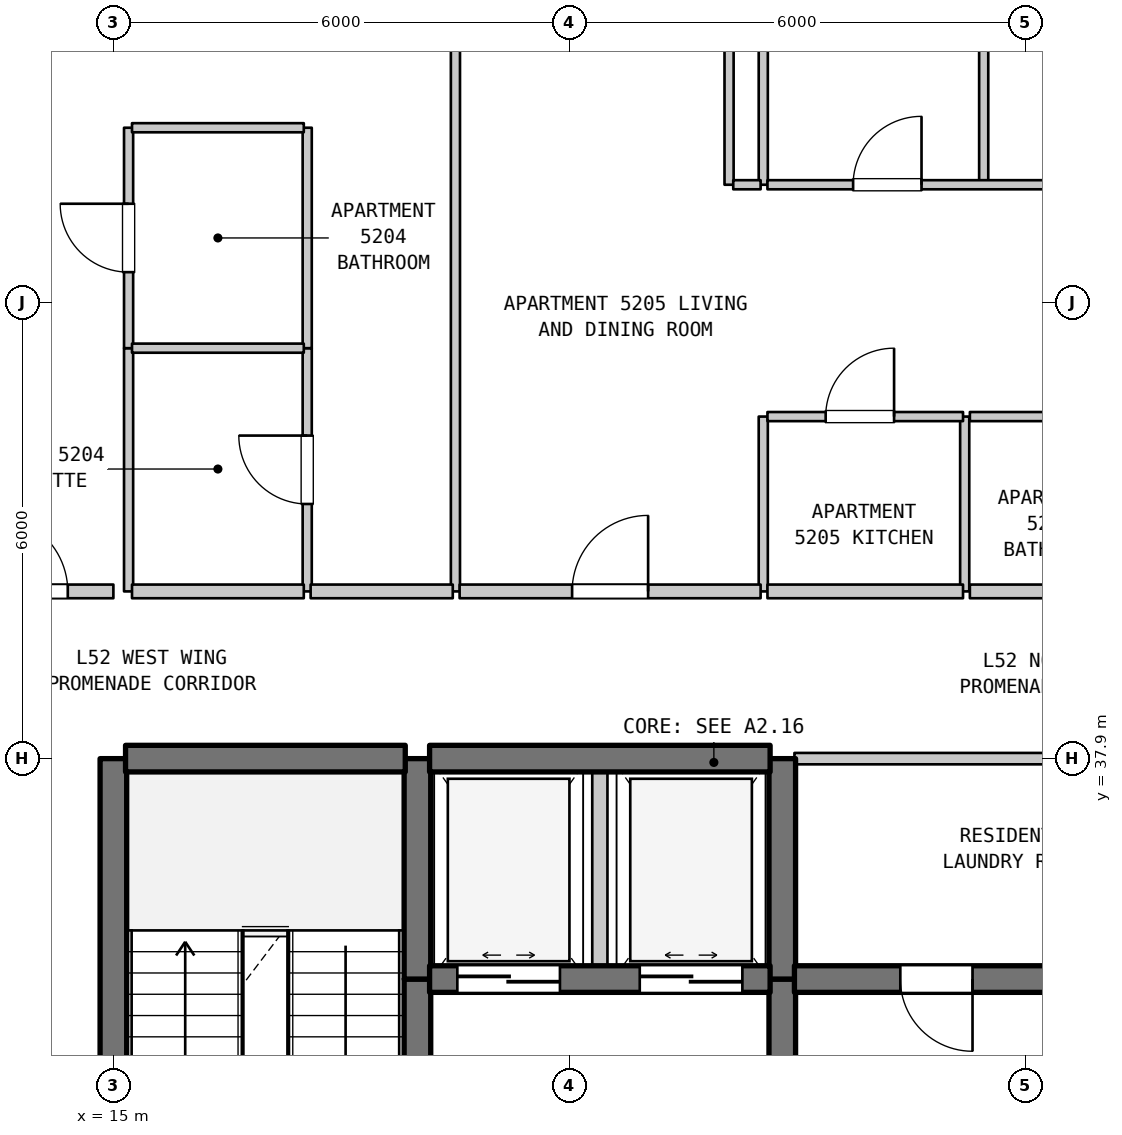
"""IFC4 building model, lengths in metres.
Left out: names, types, materials, properties, quantities, classifications, styles, units other than length and angle.
Written with IfcOpenShell. Run it as: python <this file> out.ifc"""

import sys

from ifc_helpers import new_model, si_unit, direction, frame, frame_2d, origin, place, context, subcontext, project, spatial, rectangle, extrude, element, fill, save


model = new_model("IFC4")
c1 = context("Model", 3, precision=1e-05, world=origin(), true_north=direction((0.0, 1.0)))
c2 = subcontext(c1, "Body", "Model", "MODEL_VIEW")
j1 = project(units=[si_unit("LENGTHUNIT", "METRE"), si_unit("PLANEANGLEUNIT", "RADIAN")], contexts=[c1])
p1 = place(None, origin())
s1 = spatial("IfcSite", under=j1, at=p1, CompositionType="ELEMENT")
p2 = place(p1, origin())
s2 = spatial("IfcBuilding", under=s1, at=p2, CompositionType="ELEMENT")
p3 = place(p2, frame((0.0, 0.0, 210.6)))
s3 = spatial("IfcBuildingStorey", under=s2, at=p3, CompositionType="ELEMENT", Elevation=210.6)
p4 = place(p3, frame((15.0, 31.1, 0.0), z_axis=(0.0, 0.0, 1.0), x_axis=(0.0, 1.0, 0.0)))
e1 = element("IfcWall", 1, at=p4, inside=s3, PredefinedType="SHEAR", context=c2, shape_type="SweptSolid", body=[
    extrude(rectangle(XDim=6.8, YDim=0.35, at=frame_2d((3.4, 0.0))), origin(), (0.0, 0.0, 1.0), 3.39),
])
p5 = place(p3, frame((15.2, 40.1, 0.0), z_axis=(0.0, 0.0, 1.0), x_axis=(0.0, 1.0, 0.0)))
e2 = element("IfcWall", 2, at=p5, inside=s3, PredefinedType="PARTITIONING", context=c2, shape_type="SweptSolid", body=[
    extrude(rectangle(XDim=3.2, YDim=0.12, at=frame_2d((1.6, 0.0))), origin(), (0.0, 0.0, 1.0), 3.39),
])
p6 = place(p3, frame((15.2, 43.3, 0.0), z_axis=(0.0, 0.0, 1.0), x_axis=(0.0, 1.0, 0.0)))
e3 = element("IfcWall", 3, at=p6, inside=s3, PredefinedType="PARTITIONING", context=c2, shape_type="SweptSolid", body=[
    extrude(rectangle(XDim=2.9, YDim=0.12, at=frame_2d((1.45, 0.0))), origin(), (0.0, 0.0, 1.0), 3.39),
])
p7 = place(p6, frame((1.0, 0.0, 0.0)))
e4 = element("IfcOpeningElement", 4, at=p7, cuts=e3, PredefinedType="OPENING", context=c2, shape_type="SweptSolid", body=[
    extrude(rectangle(XDim=0.9, YDim=2.1, at=frame_2d((0.45, 1.05))), frame((0.0, 0.07, 0.0), z_axis=(0.0, -1.0, 0.0), x_axis=(1.0, 0.0, 0.0)), (0.0, 0.0, 1.0), 0.14),
])
p8 = place(p3, frame((17.55, 40.1, 0.0), z_axis=(0.0, 0.0, 1.0), x_axis=(0.0, 1.0, 0.0)))
e5 = element("IfcWall", 5, at=p8, inside=s3, PredefinedType="PARTITIONING", context=c2, shape_type="SweptSolid", body=[
    extrude(rectangle(XDim=3.2, YDim=0.12, at=frame_2d((1.6, 0.0))), origin(), (0.0, 0.0, 1.0), 3.39),
])
p9 = place(p8, frame((1.15, 0.0, 0.0)))
e6 = element("IfcOpeningElement", 6, at=p9, cuts=e5, PredefinedType="OPENING", context=c2, shape_type="SweptSolid", body=[
    extrude(rectangle(XDim=0.9, YDim=2.15, at=frame_2d((0.45, 1.075))), frame((0.0, 0.07, 0.0), z_axis=(0.0, -1.0, 0.0), x_axis=(1.0, 0.0, 0.0)), (0.0, 0.0, 1.0), 0.14),
])
p10 = place(p3, frame((17.55, 43.3, 0.0), z_axis=(0.0, 0.0, 1.0), x_axis=(0.0, 1.0, 0.0)))
e7 = element("IfcWall", 7, at=p10, inside=s3, PredefinedType="PARTITIONING", context=c2, shape_type="SweptSolid", body=[
    extrude(rectangle(XDim=2.9, YDim=0.12, at=frame_2d((1.45, 0.0))), origin(), (0.0, 0.0, 1.0), 3.39),
])
p11 = place(p3, frame((19.0, 29.5, 0.0), z_axis=(0.0, 0.0, 1.0), x_axis=(0.0, 1.0, 0.0)))
e8 = element("IfcWall", 8, at=p11, inside=s3, PredefinedType="SHEAR", context=c2, shape_type="SweptSolid", body=[
    extrude(rectangle(XDim=5.5, YDim=0.35, at=frame_2d((2.75, 0.0))), origin(), (0.0, 0.0, 1.0), 3.39),
])
p12 = place(p11, frame((2.025, 0.0, 0.0)))
e9 = element("IfcOpeningElement", 9, at=p12, cuts=e8, PredefinedType="OPENING", context=c2, shape_type="SweptSolid", body=[
    extrude(rectangle(XDim=1.1, YDim=2.15, at=frame_2d((0.55, 1.075))), frame((0.0, 0.185, 0.0), z_axis=(0.0, -1.0, 0.0), x_axis=(1.0, 0.0, 0.0)), (0.0, 0.0, 1.0), 0.37),
])
p13 = place(p3, frame((19.0, 35.0, 0.0), z_axis=(0.0, 0.0, 1.0), x_axis=(0.0, 1.0, 0.0)))
e10 = element("IfcWall", 10, at=p13, inside=s3, PredefinedType="SHEAR", context=c2, shape_type="SweptSolid", body=[
    extrude(rectangle(XDim=2.9, YDim=0.35, at=frame_2d((1.45, 0.0))), origin(), (0.0, 0.0, 1.0), 3.39),
])
p14 = place(p3, frame((19.5, 40.1, 0.0), z_axis=(0.0, 0.0, 1.0), x_axis=(0.0, 1.0, 0.0)))
e11 = element("IfcWall", 11, at=p14, inside=s3, PredefinedType="PARTITIONING", context=c2, shape_type="SweptSolid", body=[
    extrude(rectangle(XDim=13.79, YDim=0.12, at=frame_2d((6.895, 0.0))), origin(), (0.0, 0.0, 1.0), 3.39),
])
p15 = place(p3, frame((21.4, 35.0, 0.0), z_axis=(0.0, 0.0, 1.0), x_axis=(0.0, 1.0, 0.0)))
e12 = element("IfcWall", 12, at=p15, inside=s3, PredefinedType="STANDARD", context=c2, shape_type="SweptSolid", body=[
    extrude(rectangle(XDim=2.9, YDim=0.2, at=frame_2d((1.45, 0.0))), origin(), (0.0, 0.0, 1.0), 3.39),
])
p16 = place(p3, frame((23.1, 45.45, 0.0), z_axis=(0.0, 0.0, 1.0), x_axis=(0.0, 1.0, 0.0)))
e13 = element("IfcWall", 13, at=p16, inside=s3, PredefinedType="PARTITIONING", context=c2, shape_type="SweptSolid", body=[
    extrude(rectangle(XDim=8.44, YDim=0.12, at=frame_2d((4.22, 0.0))), origin(), (0.0, 0.0, 1.0), 3.39),
])
p17 = place(p3, frame((23.55, 40.1, 0.0), z_axis=(0.0, 0.0, 1.0), x_axis=(0.0, 1.0, 0.0)))
e14 = element("IfcWall", 14, at=p17, inside=s3, PredefinedType="PARTITIONING", context=c2, shape_type="SweptSolid", body=[
    extrude(rectangle(XDim=2.3, YDim=0.12, at=frame_2d((1.15, 0.0))), origin(), (0.0, 0.0, 1.0), 3.39),
])
p18 = place(p3, frame((23.55, 45.45, 0.0), z_axis=(0.0, 0.0, 1.0), x_axis=(0.0, 1.0, 0.0)))
e15 = element("IfcWall", 15, at=p18, inside=s3, PredefinedType="PARTITIONING", context=c2, shape_type="SweptSolid", body=[
    extrude(rectangle(XDim=8.44, YDim=0.12, at=frame_2d((4.22, 0.0))), origin(), (0.0, 0.0, 1.0), 3.39),
])
p19 = place(p3, frame((23.8, 31.5, 0.0), z_axis=(0.0, 0.0, 1.0), x_axis=(0.0, 1.0, 0.0)))
e16 = element("IfcWall", 16, at=p19, inside=s3, PredefinedType="SHEAR", context=c2, shape_type="SweptSolid", body=[
    extrude(rectangle(XDim=3.5, YDim=0.35, at=frame_2d((1.75, 0.0))), origin(), (0.0, 0.0, 1.0), 3.39),
])
p20 = place(p19, frame((1.127, 0.0, 0.0)))
e17 = element("IfcOpeningElement", 17, at=p20, cuts=e16, PredefinedType="OPENING", context=c2, shape_type="SweptSolid", body=[
    extrude(rectangle(XDim=1.1, YDim=2.15, at=frame_2d((0.55, 1.075))), frame((0.0, 0.185, 0.0), z_axis=(0.0, -1.0, 0.0), x_axis=(1.0, 0.0, 0.0)), (0.0, 0.0, 1.0), 0.37),
])
p21 = place(p3, frame((23.8, 35.0, 0.0), z_axis=(0.0, 0.0, 1.0), x_axis=(0.0, 1.0, 0.0)))
e18 = element("IfcWall", 18, at=p21, inside=s3, PredefinedType="SHEAR", context=c2, shape_type="SweptSolid", body=[
    extrude(rectangle(XDim=2.9, YDim=0.35, at=frame_2d((1.45, 0.0))), origin(), (0.0, 0.0, 1.0), 3.39),
])
p22 = place(p3, frame((26.2, 40.1, 0.0), z_axis=(0.0, 0.0, 1.0), x_axis=(0.0, 1.0, 0.0)))
e19 = element("IfcWall", 19, at=p22, inside=s3, PredefinedType="PARTITIONING", context=c2, shape_type="SweptSolid", body=[
    extrude(rectangle(XDim=2.3, YDim=0.12, at=frame_2d((1.15, 0.0))), origin(), (0.0, 0.0, 1.0), 3.39),
])
p23 = place(p3, frame((26.45, 45.45, 0.0), z_axis=(0.0, 0.0, 1.0), x_axis=(0.0, 1.0, 0.0)))
e20 = element("IfcWall", 20, at=p23, inside=s3, PredefinedType="PARTITIONING", context=c2, shape_type="SweptSolid", body=[
    extrude(rectangle(XDim=8.44, YDim=0.12, at=frame_2d((4.22, 0.0))), origin(), (0.0, 0.0, 1.0), 3.39),
])
p24 = place(p3, frame((19.16, 35.0, 0.0), z_axis=(0.0, 0.0, 1.0), x_axis=(1.0, 0.0, 0.0)))
e21 = element("IfcWall", 21, at=p24, inside=s3, PredefinedType="SHEAR", context=c2, shape_type="SweptSolid", body=[
    extrude(rectangle(XDim=4.48, YDim=0.35, at=frame_2d((2.24, 0.0))), origin(), (0.0, 0.0, 1.0), 3.39),
])
p25 = place(p24, frame((0.365, 0.0, 0.0)))
e22 = element("IfcOpeningElement", 22, at=p25, cuts=e21, PredefinedType="OPENING", context=c2, shape_type="SweptSolid", body=[
    extrude(rectangle(XDim=1.35, YDim=2.2, at=frame_2d((0.675, 1.1))), frame((0.0, 0.185, 0.0), z_axis=(0.0, -1.0, 0.0), x_axis=(1.0, 0.0, 0.0)), (0.0, 0.0, 1.0), 0.37),
])
p26 = place(p24, frame((2.765, 0.0, 0.0)))
e23 = element("IfcOpeningElement", 23, at=p26, cuts=e21, PredefinedType="OPENING", context=c2, shape_type="SweptSolid", body=[
    extrude(rectangle(XDim=1.35, YDim=2.2, at=frame_2d((0.675, 1.1))), frame((0.0, 0.185, 0.0), z_axis=(0.0, -1.0, 0.0), x_axis=(1.0, 0.0, 0.0)), (0.0, 0.0, 1.0), 0.37),
])
p27 = place(p3, frame((23.96, 35.0, 0.0), z_axis=(0.0, 0.0, 1.0), x_axis=(1.0, 0.0, 0.0)))
e24 = element("IfcWall", 24, at=p27, inside=s3, PredefinedType="SHEAR", context=c2, shape_type="SweptSolid", body=[
    extrude(rectangle(XDim=3.995, YDim=0.35, at=frame_2d((1.998, 0.0))), origin(), (0.0, 0.0, 1.0), 3.39),
])
p28 = place(p27, frame((1.393, 0.0, 0.0)))
e25 = element("IfcOpeningElement", 25, at=p28, cuts=e24, PredefinedType="OPENING", context=c2, shape_type="SweptSolid", body=[
    extrude(rectangle(XDim=0.95, YDim=2.15, at=frame_2d((0.475, 1.075))), frame((0.0, 0.185, 0.0), z_axis=(0.0, -1.0, 0.0), x_axis=(1.0, 0.0, 0.0)), (0.0, 0.0, 1.0), 0.37),
])
p29 = place(p3, frame((15.16, 37.9, 0.0), z_axis=(0.0, 0.0, 1.0), x_axis=(1.0, 0.0, 0.0)))
e26 = element("IfcWall", 26, at=p29, inside=s3, PredefinedType="SHEAR", context=c2, shape_type="SweptSolid", body=[
    extrude(rectangle(XDim=3.68, YDim=0.35, at=frame_2d((1.84, 0.0))), origin(), (0.0, 0.0, 1.0), 3.39),
])
p30 = place(p3, frame((19.16, 37.9, 0.0), z_axis=(0.0, 0.0, 1.0), x_axis=(1.0, 0.0, 0.0)))
e27 = element("IfcWall", 27, at=p30, inside=s3, PredefinedType="SHEAR", context=c2, shape_type="SweptSolid", body=[
    extrude(rectangle(XDim=4.48, YDim=0.35, at=frame_2d((2.24, 0.0))), origin(), (0.0, 0.0, 1.0), 3.39),
])
p31 = place(p3, frame((23.96, 37.9, 0.0), z_axis=(0.0, 0.0, 1.0), x_axis=(1.0, 0.0, 0.0)))
e28 = element("IfcWall", 28, at=p31, inside=s3, PredefinedType="STANDARD", context=c2, shape_type="SweptSolid", body=[
    extrude(rectangle(XDim=3.995, YDim=0.15, at=frame_2d((1.998, 0.0))), origin(), (0.0, 0.0, 1.0), 2.89),
])
p32 = place(p3, frame((12.875, 40.1, 0.0), z_axis=(0.0, 0.0, 1.0), x_axis=(1.0, 0.0, 0.0)))
e29 = element("IfcWall", 29, at=p32, inside=s3, PredefinedType="STANDARD", context=c2, shape_type="SweptSolid", body=[
    extrude(rectangle(XDim=2.125, YDim=0.18, at=frame_2d((1.062, 0.0))), origin(), (0.0, 0.0, 1.0), 3.39),
])
p33 = place(p32, frame((0.525, 0.0, 0.0)))
e30 = element("IfcOpeningElement", 30, at=p33, cuts=e29, PredefinedType="OPENING", context=c2, shape_type="SweptSolid", body=[
    extrude(rectangle(XDim=1.0, YDim=2.15, at=frame_2d((0.5, 1.075))), frame((0.0, 0.1, 0.0), z_axis=(0.0, -1.0, 0.0), x_axis=(1.0, 0.0, 0.0)), (0.0, 0.0, 1.0), 0.2),
])
p34 = place(p3, frame((15.245, 40.1, 0.0), z_axis=(0.0, 0.0, 1.0), x_axis=(1.0, 0.0, 0.0)))
e31 = element("IfcWall", 31, at=p34, inside=s3, PredefinedType="STANDARD", context=c2, shape_type="SweptSolid", body=[
    extrude(rectangle(XDim=2.26, YDim=0.18, at=frame_2d((1.13, 0.0))), origin(), (0.0, 0.0, 1.0), 3.39),
])
p35 = place(p3, frame((17.595, 40.1, 0.0), z_axis=(0.0, 0.0, 1.0), x_axis=(1.0, 0.0, 0.0)))
e32 = element("IfcWall", 32, at=p35, inside=s3, PredefinedType="STANDARD", context=c2, shape_type="SweptSolid", body=[
    extrude(rectangle(XDim=1.87, YDim=0.18, at=frame_2d((0.935, 0.0))), origin(), (0.0, 0.0, 1.0), 3.39),
])
p36 = place(p3, frame((19.555, 40.1, 0.0), z_axis=(0.0, 0.0, 1.0), x_axis=(1.0, 0.0, 0.0)))
e33 = element("IfcWall", 33, at=p36, inside=s3, PredefinedType="STANDARD", context=c2, shape_type="SweptSolid", body=[
    extrude(rectangle(XDim=3.96, YDim=0.18, at=frame_2d((1.98, 0.0))), origin(), (0.0, 0.0, 1.0), 3.39),
])
p37 = place(p36, frame((1.48, 0.0, 0.0)))
e34 = element("IfcOpeningElement", 34, at=p37, cuts=e33, PredefinedType="OPENING", context=c2, shape_type="SweptSolid", body=[
    extrude(rectangle(XDim=1.0, YDim=2.15, at=frame_2d((0.5, 1.075))), frame((0.0, 0.1, 0.0), z_axis=(0.0, -1.0, 0.0), x_axis=(1.0, 0.0, 0.0)), (0.0, 0.0, 1.0), 0.2),
])
p38 = place(p3, frame((23.605, 40.1, 0.0), z_axis=(0.0, 0.0, 1.0), x_axis=(1.0, 0.0, 0.0)))
e35 = element("IfcWall", 35, at=p38, inside=s3, PredefinedType="STANDARD", context=c2, shape_type="SweptSolid", body=[
    extrude(rectangle(XDim=2.573, YDim=0.18, at=frame_2d((1.287, 0.0))), origin(), (0.0, 0.0, 1.0), 3.39),
])
p39 = place(p3, frame((26.268, 40.1, 0.0), z_axis=(0.0, 0.0, 1.0), x_axis=(1.0, 0.0, 0.0)))
e36 = element("IfcWall", 36, at=p39, inside=s3, PredefinedType="STANDARD", context=c2, shape_type="SweptSolid", body=[
    extrude(rectangle(XDim=3.037, YDim=0.18, at=frame_2d((1.519, 0.0))), origin(), (0.0, 0.0, 1.0), 3.39),
])
p40 = place(p3, frame((23.605, 42.4, 0.0), z_axis=(0.0, 0.0, 1.0), x_axis=(1.0, 0.0, 0.0)))
e37 = element("IfcWall", 37, at=p40, inside=s3, PredefinedType="PARTITIONING", context=c2, shape_type="SweptSolid", body=[
    extrude(rectangle(XDim=2.573, YDim=0.12, at=frame_2d((1.287, 0.0))), origin(), (0.0, 0.0, 1.0), 3.39),
])
p41 = place(p40, frame((0.766, 0.0, 0.0)))
e38 = element("IfcOpeningElement", 38, at=p41, cuts=e37, PredefinedType="OPENING", context=c2, shape_type="SweptSolid", body=[
    extrude(rectangle(XDim=0.9, YDim=2.15, at=frame_2d((0.45, 1.075))), frame((0.0, 0.07, 0.0), z_axis=(0.0, -1.0, 0.0), x_axis=(1.0, 0.0, 0.0)), (0.0, 0.0, 1.0), 0.14),
])
p42 = place(p3, frame((26.268, 42.4, 0.0), z_axis=(0.0, 0.0, 1.0), x_axis=(1.0, 0.0, 0.0)))
e39 = element("IfcWall", 39, at=p42, inside=s3, PredefinedType="PARTITIONING", context=c2, shape_type="SweptSolid", body=[
    extrude(rectangle(XDim=3.037, YDim=0.12, at=frame_2d((1.519, 0.0))), origin(), (0.0, 0.0, 1.0), 3.39),
])
p43 = place(p42, frame((1.069, 0.0, 0.0)))
e40 = element("IfcOpeningElement", 40, at=p43, cuts=e39, PredefinedType="OPENING", context=c2, shape_type="SweptSolid", body=[
    extrude(rectangle(XDim=0.9, YDim=2.1, at=frame_2d((0.45, 1.05))), frame((0.0, 0.07, 0.0), z_axis=(0.0, -1.0, 0.0), x_axis=(1.0, 0.0, 0.0)), (0.0, 0.0, 1.0), 0.14),
])
p44 = place(p3, frame((15.245, 43.3, 0.0), z_axis=(0.0, 0.0, 1.0), x_axis=(1.0, 0.0, 0.0)))
e41 = element("IfcWall", 41, at=p44, inside=s3, PredefinedType="PARTITIONING", context=c2, shape_type="SweptSolid", body=[
    extrude(rectangle(XDim=2.26, YDim=0.12, at=frame_2d((1.13, 0.0))), origin(), (0.0, 0.0, 1.0), 3.39),
])
p45 = place(p3, frame((23.155, 45.45, 0.0), z_axis=(0.0, 0.0, 1.0), x_axis=(1.0, 0.0, 0.0)))
e42 = element("IfcWall", 42, at=p45, inside=s3, PredefinedType="PARTITIONING", context=c2, shape_type="SweptSolid", body=[
    extrude(rectangle(XDim=0.36, YDim=0.12, at=frame_2d((0.18, 0.0))), origin(), (0.0, 0.0, 1.0), 3.39),
])
p46 = place(p3, frame((23.605, 45.45, 0.0), z_axis=(0.0, 0.0, 1.0), x_axis=(1.0, 0.0, 0.0)))
e43 = element("IfcWall", 43, at=p46, inside=s3, PredefinedType="PARTITIONING", context=c2, shape_type="SweptSolid", body=[
    extrude(rectangle(XDim=5.7, YDim=0.12, at=frame_2d((2.85, 0.0))), origin(), (0.0, 0.0, 1.0), 3.39),
])
p47 = place(p46, frame((1.127, 0.0, 0.0)))
e44 = element("IfcOpeningElement", 44, at=p47, cuts=e43, PredefinedType="OPENING", context=c2, shape_type="SweptSolid", body=[
    extrude(rectangle(XDim=0.9, YDim=2.15, at=frame_2d((0.45, 1.075))), frame((0.0, 0.07, 0.0), z_axis=(0.0, -1.0, 0.0), x_axis=(1.0, 0.0, 0.0)), (0.0, 0.0, 1.0), 0.14),
])
p48 = place(p46, frame((3.672, 0.0, 0.0)))
e45 = element("IfcOpeningElement", 45, at=p48, cuts=e43, PredefinedType="OPENING", context=c2, shape_type="SweptSolid", body=[
    extrude(rectangle(XDim=0.9, YDim=2.15, at=frame_2d((0.45, 1.075))), frame((0.0, 0.07, 0.0), z_axis=(0.0, -1.0, 0.0), x_axis=(1.0, 0.0, 0.0)), (0.0, 0.0, 1.0), 0.14),
])
p49 = place(p3, frame((15.245, 46.2, 0.0), z_axis=(0.0, 0.0, 1.0), x_axis=(1.0, 0.0, 0.0)))
e46 = element("IfcWall", 46, at=p49, inside=s3, PredefinedType="PARTITIONING", context=c2, shape_type="SweptSolid", body=[
    extrude(rectangle(XDim=2.26, YDim=0.12, at=frame_2d((1.13, 0.0))), origin(), (0.0, 0.0, 1.0), 3.39),
])
p50 = place(p7, origin())
e47 = element("IfcDoor", 47, at=p50, inside=s3, OperationType="SINGLE_SWING_RIGHT", PredefinedType="DOOR", context=c2, shape_type="SweptSolid", body=[
    extrude(rectangle(XDim=0.9, YDim=2.1, at=frame_2d((0.45, 1.05))), frame((0.0, 0.025, 0.0), z_axis=(0.0, -1.0, 0.0), x_axis=(1.0, 0.0, 0.0)), (0.0, 0.0, 1.0), 0.05),
])
fill(e4, e47)
p51 = place(p9, origin())
e48 = element("IfcDoor", 48, at=p51, inside=s3, OperationType="SINGLE_SWING_RIGHT", PredefinedType="DOOR", context=c2, shape_type="SweptSolid", body=[
    extrude(rectangle(XDim=0.9, YDim=2.15, at=frame_2d((0.45, 1.075))), frame((0.0, 0.025, 0.0), z_axis=(0.0, -1.0, 0.0), x_axis=(1.0, 0.0, 0.0)), (0.0, 0.0, 1.0), 0.05),
])
fill(e6, e48)
p52 = place(p25, origin())
e49 = element("IfcDoor", 49, at=p52, inside=s3, OperationType="DOUBLE_DOOR_SLIDING", PredefinedType="DOOR", context=c2, shape_type="SweptSolid", body=[
    extrude(rectangle(XDim=1.35, YDim=2.2, at=frame_2d((0.675, 1.1))), frame((0.0, 0.025, 0.0), z_axis=(0.0, -1.0, 0.0), x_axis=(1.0, 0.0, 0.0)), (0.0, 0.0, 1.0), 0.05),
])
fill(e22, e49)
p53 = place(p26, origin())
e50 = element("IfcDoor", 50, at=p53, inside=s3, OperationType="DOUBLE_DOOR_SLIDING", PredefinedType="DOOR", context=c2, shape_type="SweptSolid", body=[
    extrude(rectangle(XDim=1.35, YDim=2.2, at=frame_2d((0.675, 1.1))), frame((0.0, 0.025, 0.0), z_axis=(0.0, -1.0, 0.0), x_axis=(1.0, 0.0, 0.0)), (0.0, 0.0, 1.0), 0.05),
])
fill(e23, e50)
p54 = place(p28, frame((0.95, 0.0, 0.0), z_axis=(0.0, 0.0, 1.0), x_axis=(-1.0, 0.0, 0.0)))
e51 = element("IfcDoor", 51, at=p54, inside=s3, OperationType="SINGLE_SWING_RIGHT", PredefinedType="DOOR", context=c2, shape_type="SweptSolid", body=[
    extrude(rectangle(XDim=0.95, YDim=2.15, at=frame_2d((0.475, 1.075))), frame((0.0, 0.025, 0.0), z_axis=(0.0, -1.0, 0.0), x_axis=(1.0, 0.0, 0.0)), (0.0, 0.0, 1.0), 0.05),
])
fill(e25, e51)
p55 = place(p33, origin())
e52 = element("IfcDoor", 52, at=p55, inside=s3, OperationType="SINGLE_SWING_LEFT", PredefinedType="DOOR", context=c2, shape_type="SweptSolid", body=[
    extrude(rectangle(XDim=1.0, YDim=2.15, at=frame_2d((0.5, 1.075))), frame((0.0, 0.025, 0.0), z_axis=(0.0, -1.0, 0.0), x_axis=(1.0, 0.0, 0.0)), (0.0, 0.0, 1.0), 0.05),
])
fill(e30, e52)
p56 = place(p37, origin())
e53 = element("IfcDoor", 53, at=p56, inside=s3, OperationType="SINGLE_SWING_RIGHT", PredefinedType="DOOR", context=c2, shape_type="SweptSolid", body=[
    extrude(rectangle(XDim=1.0, YDim=2.15, at=frame_2d((0.5, 1.075))), frame((0.0, 0.025, 0.0), z_axis=(0.0, -1.0, 0.0), x_axis=(1.0, 0.0, 0.0)), (0.0, 0.0, 1.0), 0.05),
])
fill(e34, e53)
p57 = place(p41, origin())
e54 = element("IfcDoor", 54, at=p57, inside=s3, OperationType="SINGLE_SWING_RIGHT", PredefinedType="DOOR", context=c2, shape_type="SweptSolid", body=[
    extrude(rectangle(XDim=0.9, YDim=2.15, at=frame_2d((0.45, 1.075))), frame((0.0, 0.025, 0.0), z_axis=(0.0, -1.0, 0.0), x_axis=(1.0, 0.0, 0.0)), (0.0, 0.0, 1.0), 0.05),
])
fill(e38, e54)
p58 = place(p47, origin())
e55 = element("IfcDoor", 55, at=p58, inside=s3, OperationType="SINGLE_SWING_RIGHT", PredefinedType="DOOR", context=c2, shape_type="SweptSolid", body=[
    extrude(rectangle(XDim=0.9, YDim=2.15, at=frame_2d((0.45, 1.075))), frame((0.0, 0.025, 0.0), z_axis=(0.0, -1.0, 0.0), x_axis=(1.0, 0.0, 0.0)), (0.0, 0.0, 1.0), 0.05),
])
fill(e44, e55)
save(model, sys.argv[1])
